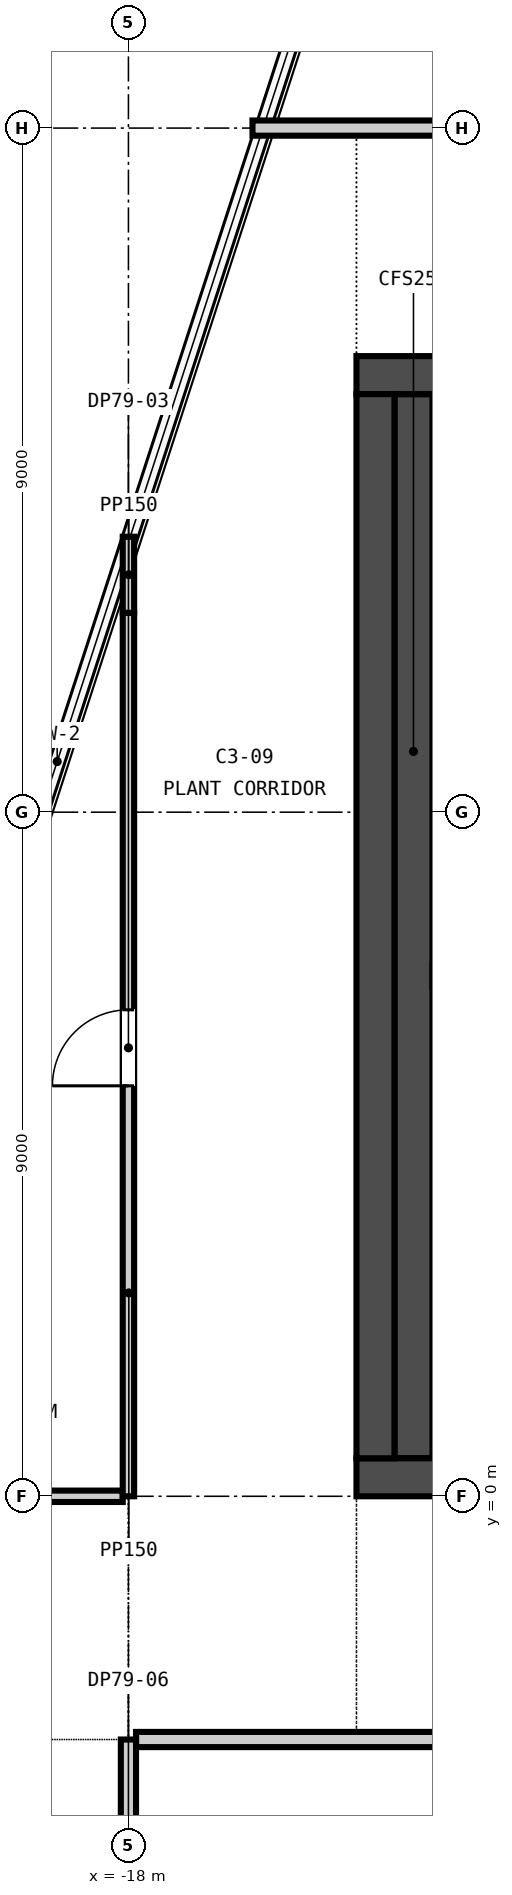
"""IFC4 building model, lengths in metres.
Left out: names, types, materials, properties, quantities, classifications, styles, units other than length and angle.
Written with IfcOpenShell. Run it as: python <this file> out.ifc"""

import sys

from ifc_helpers import new_model, si_unit, direction, frame, frame_2d, origin, place, context, subcontext, project, spatial, rectangle, extrude, element, fill, save


model = new_model("IFC4")
c1 = context("Model", 3, precision=1e-05, world=origin(), true_north=direction((0.0, 1.0)))
c2 = subcontext(c1, "Body", "Model", "MODEL_VIEW")
j1 = project(units=[si_unit("LENGTHUNIT", "METRE"), si_unit("PLANEANGLEUNIT", "RADIAN")], contexts=[c1])
p1 = place(None, origin())
s1 = spatial("IfcSite", under=j1, at=p1, CompositionType="ELEMENT")
p2 = place(p1, origin())
s2 = spatial("IfcBuilding", under=s1, at=p2, CompositionType="ELEMENT")
p3 = place(p2, frame((0.0, 0.0, 311.1)))
s3 = spatial("IfcBuildingStorey", under=s2, at=p3, CompositionType="ELEMENT", Elevation=311.1)
p4 = place(p3, frame((-15.0, 0.25, -0.25), z_axis=(0.0, 0.0, 1.0), x_axis=(1.0, 0.0, 0.0)))
e1 = element("IfcWall", 1, at=p4, inside=s3, PredefinedType="SOLIDWALL", context=c2, shape_type="SweptSolid", body=[
    extrude(rectangle(XDim=30.0, YDim=0.5, at=frame_2d((15.0, 0.0))), origin(), (0.0, 0.0, 1.0), 4.5),
])
p5 = place(p3, frame((-15.0, 14.75, -0.25), z_axis=(0.0, 0.0, 1.0), x_axis=(1.0, 0.0, 0.0)))
e2 = element("IfcWall", 2, at=p5, inside=s3, PredefinedType="SOLIDWALL", context=c2, shape_type="SweptSolid", body=[
    extrude(rectangle(XDim=30.0, YDim=0.5, at=frame_2d((15.0, 0.0))), origin(), (0.0, 0.0, 1.0), 4.5),
])
p6 = place(p5, frame((1.5, 0.0, 0.25)))
e3 = element("IfcOpeningElement", 3, at=p6, cuts=e2, PredefinedType="OPENING", context=c2, shape_type="SweptSolid", body=[
    extrude(rectangle(XDim=1.2, YDim=2.1, at=frame_2d((0.6, 1.05))), frame((0.0, 0.26, 0.0), z_axis=(0.0, -1.0, 0.0), x_axis=(1.0, 0.0, 0.0)), (0.0, 0.0, 1.0), 0.52),
])
p7 = place(p5, frame((27.3, 0.0, 0.25)))
e4 = element("IfcOpeningElement", 4, at=p7, cuts=e2, PredefinedType="OPENING", context=c2, shape_type="SweptSolid", body=[
    extrude(rectangle(XDim=1.2, YDim=2.1, at=frame_2d((0.6, 1.05))), frame((0.0, 0.26, 0.0), z_axis=(0.0, -1.0, 0.0), x_axis=(1.0, 0.0, 0.0)), (0.0, 0.0, 1.0), 0.52),
])
p8 = place(p5, frame((9.25, 0.0, 0.25)))
e5 = element("IfcOpeningElement", 5, at=p8, cuts=e2, PredefinedType="OPENING", context=c2, shape_type="SweptSolid", body=[
    extrude(rectangle(XDim=1.5, YDim=2.1, at=frame_2d((0.75, 1.05))), frame((0.0, 0.26, 0.0), z_axis=(0.0, -1.0, 0.0), x_axis=(1.0, 0.0, 0.0)), (0.0, 0.0, 1.0), 0.52),
])
p9 = place(p3, frame((-14.75, 0.5, -0.25), z_axis=(0.0, 0.0, 1.0), x_axis=(0.0, 1.0, 0.0)))
e6 = element("IfcWall", 6, at=p9, inside=s3, PredefinedType="SOLIDWALL", context=c2, shape_type="SweptSolid", body=[
    extrude(rectangle(XDim=14.0, YDim=0.5, at=frame_2d((7.0, 0.0))), origin(), (0.0, 0.0, 1.0), 4.5),
])
p10 = place(p3, frame((-14.25, 0.5, 0.0), z_axis=(0.0, 0.0, 1.0), x_axis=(0.0, 1.0, 0.0)))
e7 = element("IfcWall", 7, at=p10, inside=s3, PredefinedType="SOLIDWALL", context=c2, shape_type="SweptSolid", body=[
    extrude(rectangle(XDim=14.0, YDim=0.5, at=frame_2d((7.0, 0.0))), origin(), (0.0, 0.0, 1.0), 4.25),
])
p11 = place(p3, frame((-17.9, -3.2, 0.0), z_axis=(0.0, 0.0, 1.0), x_axis=(1.0, 0.0, 0.0)))
e8 = element("IfcWall", 8, at=p11, inside=s3, PredefinedType="PARTITIONING", context=c2, shape_type="SweptSolid", body=[
    extrude(rectangle(XDim=8.8, YDim=0.2, at=frame_2d((4.4, 0.0))), origin(), (0.0, 0.0, 1.0), 4.25),
])
p12 = place(p3, frame((-22.216, 0.0, 0.0), z_axis=(0.0, 0.0, 1.0), x_axis=(1.0, 0.0, 0.0)))
e9 = element("IfcWall", 9, at=p12, inside=s3, PredefinedType="PARTITIONING", context=c2, shape_type="SweptSolid", body=[
    extrude(rectangle(XDim=4.141, YDim=0.15, at=frame_2d((2.071, 0.0))), origin(), (0.0, 0.0, 1.0), 4.25),
])
p13 = place(p3, frame((-16.368, 18.0, 0.0), z_axis=(0.0, 0.0, 1.0), x_axis=(1.0, 0.0, 0.0)))
e10 = element("IfcWall", 10, at=p13, inside=s3, PredefinedType="PARTITIONING", context=c2, shape_type="SweptSolid", body=[
    extrude(rectangle(XDim=28.545, YDim=0.2, at=frame_2d((14.272, 0.0))), origin(), (0.0, 0.0, 1.0), 4.25),
])
p14 = place(p13, frame((9.268, 0.0, 0.0)))
e11 = element("IfcOpeningElement", 11, at=p14, cuts=e10, PredefinedType="OPENING", context=c2, shape_type="SweptSolid", body=[
    extrude(rectangle(XDim=1.0, YDim=2.1, at=frame_2d((0.5, 1.05))), frame((0.0, 0.11, 0.0), z_axis=(0.0, -1.0, 0.0), x_axis=(1.0, 0.0, 0.0)), (0.0, 0.0, 1.0), 0.22),
])
p15 = place(p13, frame((22.595, 0.0, 0.0)))
e12 = element("IfcOpeningElement", 12, at=p15, cuts=e10, PredefinedType="OPENING", context=c2, shape_type="SweptSolid", body=[
    extrude(rectangle(XDim=1.0, YDim=2.1, at=frame_2d((0.5, 1.05))), frame((0.0, 0.11, 0.0), z_axis=(0.0, -1.0, 0.0), x_axis=(1.0, 0.0, 0.0)), (0.0, 0.0, 1.0), 0.22),
])
p16 = place(p3, frame((-18.0, -10.933, 0.0), z_axis=(0.0, 0.0, 1.0), x_axis=(0.0, 1.0, 0.0)))
e13 = element("IfcWall", 13, at=p16, inside=s3, PredefinedType="PARTITIONING", context=c2, shape_type="SweptSolid", body=[
    extrude(rectangle(XDim=7.733, YDim=0.2, at=frame_2d((3.867, 0.0))), origin(), (0.0, 0.0, 1.0), 4.25),
])
p17 = place(p16, frame((3.4, 0.0, 0.0)))
e14 = element("IfcOpeningElement", 14, at=p17, cuts=e13, PredefinedType="OPENING", context=c2, shape_type="SweptSolid", body=[
    extrude(rectangle(XDim=1.0, YDim=2.1, at=frame_2d((0.5, 1.05))), frame((0.0, 0.11, 0.0), z_axis=(0.0, -1.0, 0.0), x_axis=(1.0, 0.0, 0.0)), (0.0, 0.0, 1.0), 0.22),
])
p18 = place(p3, frame((-18.0, 0.0, 0.0), z_axis=(0.0, 0.0, 1.0), x_axis=(0.0, 1.0, 0.0)))
e15 = element("IfcWall", 15, at=p18, inside=s3, PredefinedType="PARTITIONING", context=c2, shape_type="SweptSolid", body=[
    extrude(rectangle(XDim=11.624, YDim=0.15, at=frame_2d((5.812, 0.0))), origin(), (0.0, 0.0, 1.0), 4.25),
])
p19 = place(p18, frame((5.4, 0.0, 0.0)))
e16 = element("IfcOpeningElement", 16, at=p19, cuts=e15, PredefinedType="OPENING", context=c2, shape_type="SweptSolid", body=[
    extrude(rectangle(XDim=1.0, YDim=2.1, at=frame_2d((0.5, 1.05))), frame((0.0, 0.085, 0.0), z_axis=(0.0, -1.0, 0.0), x_axis=(1.0, 0.0, 0.0)), (0.0, 0.0, 1.0), 0.17),
])
p20 = place(p3, frame((-18.0, 11.624, 0.0), z_axis=(0.0, 0.0, 1.0), x_axis=(0.0, 1.0, 0.0)))
e17 = element("IfcWall", 17, at=p20, inside=s3, PredefinedType="PARTITIONING", context=c2, shape_type="SweptSolid", body=[
    extrude(rectangle(XDim=1.0, YDim=0.15, at=frame_2d((0.5, 0.0))), origin(), (0.0, 0.0, 1.0), 3.634),
])
p21 = place(p19, origin())
e18 = element("IfcDoor", 18, at=p21, inside=s3, OperationType="SINGLE_SWING_LEFT", PredefinedType="DOOR", context=c2, shape_type="SweptSolid", body=[
    extrude(rectangle(XDim=1.0, YDim=2.1, at=frame_2d((0.5, 1.05))), frame((0.0, 0.025, 0.0), z_axis=(0.0, -1.0, 0.0), x_axis=(1.0, 0.0, 0.0)), (0.0, 0.0, 1.0), 0.05),
])
fill(e16, e18)
save(model, sys.argv[1])
